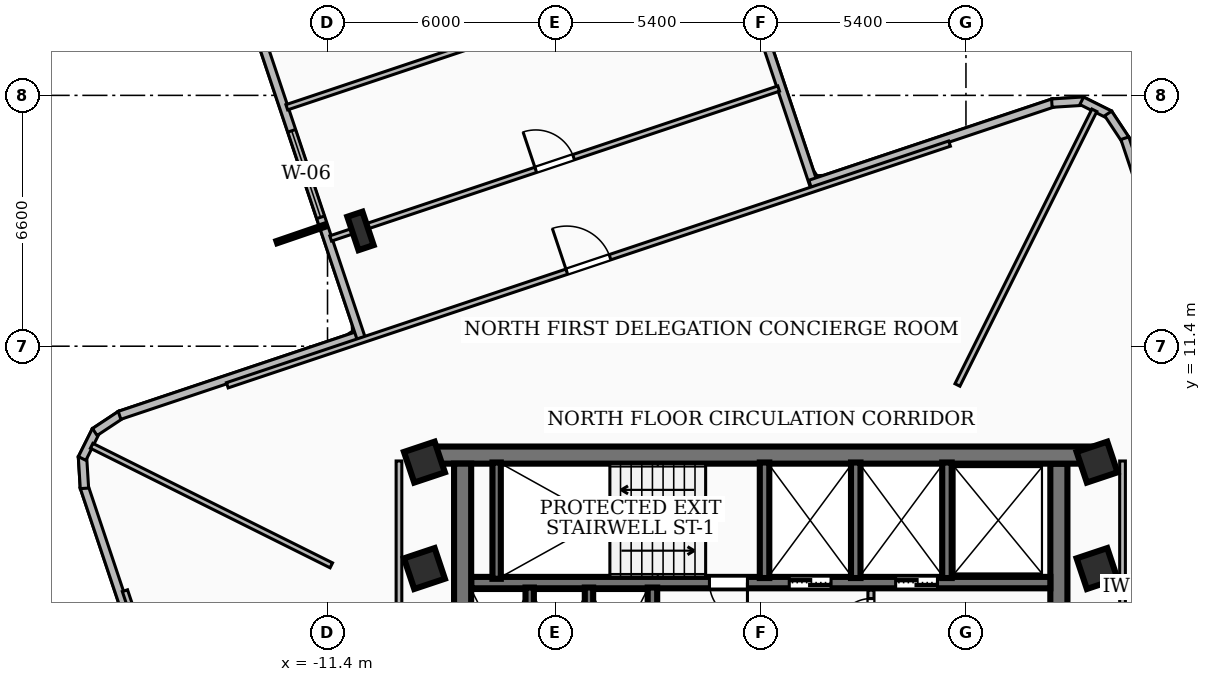
"""IFC4 building model, lengths in metres.
Left out: names, types, materials, properties, quantities, classifications, styles, units other than length and angle.
Written with IfcOpenShell. Run it as: python <this file> out.ifc"""

import sys

from ifc_helpers import new_model, si_unit, direction, frame, frame_2d, origin, origin_2d, place, context, subcontext, project, spatial, rectangle, i_section, extrude, element, fill, save


model = new_model("IFC4")
c1 = context("Model", 3, precision=1e-05, world=origin(), true_north=direction((0.0, 1.0)))
c2 = subcontext(c1, "Body", "Model", "MODEL_VIEW")
j1 = project(units=[si_unit("LENGTHUNIT", "METRE"), si_unit("PLANEANGLEUNIT", "RADIAN")], contexts=[c1])
p1 = place(None, origin())
s1 = spatial("IfcSite", under=j1, at=p1, CompositionType="ELEMENT")
p2 = place(p1, origin())
s2 = spatial("IfcBuilding", under=s1, at=p2, CompositionType="ELEMENT")
p3 = place(p2, frame((0.0, 0.0, 159.48)))
s3 = spatial("IfcBuildingStorey", under=s2, at=p3, CompositionType="ELEMENT", Elevation=159.48)
p4 = place(p3, frame((-8.78, 8.535, 0.0), z_axis=(0.0, 0.0, 1.0), x_axis=(1.0, 0.0, 0.0)))
e1 = element("IfcWall", 1, at=p4, inside=s3, PredefinedType="SHEAR", context=c2, shape_type="SweptSolid", body=[
    extrude(rectangle(XDim=17.56, YDim=0.45, at=frame_2d((8.78, 0.0))), origin(), (0.0, 0.0, 1.0), 3.34),
])
for number, where, z_axis, x_axis in (
    (2, (-7.845, 1.975, 0.0), (0.0, 0.0, 1.0), (0.0, 1.0, 0.0)),
    (3, (7.845, 8.31, 0.0), (0.0, 0.0, 1.0), (0.0, -1.0, 0.0)),
):
    element("IfcWall", number, at=place(p3, frame(where, z_axis=z_axis, x_axis=x_axis)), inside=s3, PredefinedType="SHEAR", context=c2, shape_type="SweptSolid", body=[
        extrude(rectangle(XDim=6.335, YDim=0.45, at=frame_2d((3.167, 0.0))), origin(), (0.0, 0.0, 1.0), 3.34),
    ])
p5 = place(p3, frame((7.62, 5.18, 0.0), z_axis=(0.0, 0.0, 1.0), x_axis=(-1.0, 0.0, 0.0)))
e4 = element("IfcWall", 4, at=p5, inside=s3, PredefinedType="SOLIDWALL", context=c2, shape_type="SweptSolid", body=[
    extrude(rectangle(XDim=15.24, YDim=0.3, at=frame_2d((7.62, 0.0))), origin(), (0.0, 0.0, 1.0), 3.34),
])
p6 = place(p5, frame((5.77, 0.0, 0.0)))
e5 = element("IfcOpeningElement", 5, at=p6, cuts=e4, PredefinedType="OPENING", context=c2, shape_type="SweptSolid", body=[
    extrude(rectangle(XDim=1.1, YDim=2.15, at=frame_2d((0.55, 1.075))), frame((0.0, 0.16, 0.0), z_axis=(0.0, -1.0, 0.0), x_axis=(1.0, 0.0, 0.0)), (0.0, 0.0, 1.0), 0.32),
])
p7 = place(p5, frame((2.97, 0.0, 0.0)))
e6 = element("IfcOpeningElement", 6, at=p7, cuts=e4, PredefinedType="OPENING", context=c2, shape_type="SweptSolid", body=[
    extrude(rectangle(XDim=1.1, YDim=2.15, at=frame_2d((0.55, 1.075))), frame((0.0, 0.16, 0.0), z_axis=(0.0, -1.0, 0.0), x_axis=(1.0, 0.0, 0.0)), (0.0, 0.0, 1.0), 0.32),
])
p8 = place(p5, frame((7.97, 0.0, 0.0)))
e7 = element("IfcOpeningElement", 7, at=p8, cuts=e4, PredefinedType="OPENING", context=c2, shape_type="SweptSolid", body=[
    extrude(rectangle(XDim=1.0, YDim=2.1, at=frame_2d((0.5, 1.05))), frame((0.0, 0.16, 0.0), z_axis=(0.0, -1.0, 0.0), x_axis=(1.0, 0.0, 0.0)), (0.0, 0.0, 1.0), 0.32),
])
p9 = place(p3, frame((-6.95, 5.28, 0.0), z_axis=(0.0, 0.0, 1.0), x_axis=(0.0, 1.0, 0.0)))
e8 = element("IfcWall", 8, at=p9, inside=s3, PredefinedType="SOLIDWALL", context=c2, shape_type="SweptSolid", body=[
    extrude(rectangle(XDim=3.06, YDim=0.22, at=frame_2d((1.53, 0.0))), origin(), (0.0, 0.0, 1.0), 3.34),
])
for number, where, z_axis, x_axis in (
    (9, (0.1, 5.3, 0.0), (0.0, 0.0, 1.0), (0.0, 1.0, 0.0)),
    (10, (2.5, 5.3, 0.0), (0.0, 0.0, 1.0), (0.0, 1.0, 0.0)),
    (11, (4.9, 5.3, 0.0), (0.0, 0.0, 1.0), (0.0, 1.0, 0.0)),
):
    element("IfcWall", number, at=place(p3, frame(where, z_axis=z_axis, x_axis=x_axis)), inside=s3, PredefinedType="SOLIDWALL", context=c2, shape_type="SweptSolid", body=[
        extrude(rectangle(XDim=3.04, YDim=0.25, at=frame_2d((1.52, 0.0))), origin(), (0.0, 0.0, 1.0), 3.34),
    ])
p10 = place(p3, frame((-2.85, 1.98, 0.0), z_axis=(0.0, 0.0, 1.0), x_axis=(0.0, 1.0, 0.0)))
e12 = element("IfcWall", 12, at=p10, inside=s3, PredefinedType="SOLIDWALL", context=c2, shape_type="SweptSolid", body=[
    extrude(rectangle(XDim=3.07, YDim=0.25, at=frame_2d((1.535, 0.0))), origin(), (0.0, 0.0, 1.0), 3.34),
])
for number, where, z_axis, x_axis in (
    (13, (-6.08, 1.98, 0.0), (0.0, 0.0, 1.0), (0.0, 1.0, 0.0)),
    (14, (-4.52, 1.98, 0.0), (0.0, 0.0, 1.0), (0.0, 1.0, 0.0)),
):
    element("IfcWall", number, at=place(p3, frame(where, z_axis=z_axis, x_axis=x_axis)), inside=s3, PredefinedType="SOLIDWALL", context=c2, shape_type="SweptSolid", body=[
        extrude(rectangle(XDim=3.07, YDim=0.22, at=frame_2d((1.535, 0.0))), origin(), (0.0, 0.0, 1.0), 3.34),
    ])
for number, where, z_axis, x_axis in (
    (15, (-8.85, 5.55, 0.0), (0.0, 0.0, 1.0), (0.948, 0.317, 0.0)),
    (16, (8.85, 5.55, 0.0), (0.0, 0.0, 1.0), (0.948, 0.317, 0.0)),
    (17, (-8.85, 8.35, 0.0), (0.0, 0.0, 1.0), (0.948, 0.317, 0.0)),
    (18, (8.85, 8.35, 0.0), (0.0, 0.0, 1.0), (0.948, 0.317, 0.0)),
):
    element("IfcColumn", number, at=place(p3, frame(where, z_axis=z_axis, x_axis=x_axis)), inside=s3, PredefinedType="COLUMN", context=c2, shape_type="SweptSolid", body=[
        extrude(rectangle(XDim=0.85, YDim=0.85, at=origin_2d()), origin(), (0.0, 0.0, 1.0), 3.6),
    ])
p11 = place(p3, frame((-10.533, 14.433, 0.0), z_axis=(0.0, 0.0, 1.0), x_axis=(0.948323655206, 0.317304656405, 0.0)))
e19 = element("IfcColumn", 19, at=p11, inside=s3, PredefinedType="COLUMN", context=c2, shape_type="SweptSolid", body=[
    extrude(i_section(OverallWidth=0.418, OverallDepth=0.927, WebThickness=0.019, FlangeThickness=0.032, at=origin_2d()), origin(), (0.0, 0.0, 1.0), 3.6),
])
p12 = place(p3, frame((-15.662, 1.3, 0.0), z_axis=(0.0, 0.0, 1.0), x_axis=(-0.317224676093, 0.948350412494, 0.0)))
e20 = element("IfcWall", 20, at=p12, inside=s3, PredefinedType="SOLIDWALL", context=c2, shape_type="SweptSolid", body=[
    extrude(rectangle(XDim=6.758, YDim=0.22, at=frame_2d((3.379, 0.0))), origin(), (0.0, 0.0, 1.0), 3.34),
])
p13 = place(p3, frame((-17.796, 7.66, 0.0), z_axis=(0.0, 0.0, 1.0), x_axis=(-0.062305442082, 0.998057128569, 0.0)))
e21 = element("IfcWall", 21, at=p13, inside=s3, PredefinedType="SOLIDWALL", context=c2, shape_type="SweptSolid", body=[
    extrude(rectangle(XDim=0.835, YDim=0.22, at=frame_2d((0.417, 0.0))), origin(), (0.0, 0.0, 1.0), 3.34),
])
p14 = place(p3, frame((-17.857, 8.446, 0.0), z_axis=(0.0, 0.0, 1.0), x_axis=(0.446258139106, 0.894904281631, 0.0)))
e22 = element("IfcWall", 22, at=p14, inside=s3, PredefinedType="SOLIDWALL", context=c2, shape_type="SweptSolid", body=[
    extrude(rectangle(XDim=0.818, YDim=0.22, at=frame_2d((0.409, 0.0))), origin(), (0.0, 0.0, 1.0), 3.34),
])
p15 = place(p3, frame((-17.524, 9.142, 0.0), z_axis=(0.0, 0.0, 1.0), x_axis=(0.833756011094, 0.552133058206, 0.0)))
e23 = element("IfcWall", 23, at=p15, inside=s3, PredefinedType="SOLIDWALL", context=c2, shape_type="SweptSolid", body=[
    extrude(rectangle(XDim=0.835, YDim=0.22, at=frame_2d((0.417, 0.0))), origin(), (0.0, 0.0, 1.0), 3.34),
])
p16 = place(p3, frame((-16.873, 9.581, 0.0), z_axis=(0.0, 0.0, 1.0), x_axis=(0.94829606055, 0.317387116224, 0.0)))
e24 = element("IfcWall", 24, at=p16, inside=s3, PredefinedType="SOLIDWALL", context=c2, shape_type="SweptSolid", body=[
    extrude(rectangle(XDim=6.758, YDim=0.22, at=frame_2d((3.379, 0.0))), origin(), (0.0, 0.0, 1.0), 3.34),
])
p17 = place(p3, frame((-10.519, 11.615, 0.0), z_axis=(0.0, 0.0, 1.0), x_axis=(-0.317229741122, 0.948348718219, 0.0)))
e25 = element("IfcWall", 25, at=p17, inside=s3, PredefinedType="SOLIDWALL", context=c2, shape_type="SweptSolid", body=[
    extrude(rectangle(XDim=8.259, YDim=0.22, at=frame_2d((4.129, 0.0))), origin(), (0.0, 0.0, 1.0), 3.34),
])
p18 = place(p17, frame((3.35, 0.0, 0.85)))
e26 = element("IfcOpeningElement", 26, at=p18, cuts=e25, PredefinedType="OPENING", context=c2, shape_type="SweptSolid", body=[
    extrude(rectangle(XDim=2.4, YDim=1.85, at=frame_2d((1.2, 0.925))), frame((0.0, 0.12, 0.0), z_axis=(0.0, -1.0, 0.0), x_axis=(1.0, 0.0, 0.0)), (0.0, 0.0, 1.0), 0.24),
])
p19 = place(p3, frame((-1.21, 23.438, 0.0), z_axis=(0.0, 0.0, 1.0), x_axis=(0.317371670522, -0.948301229963, 0.0)))
e27 = element("IfcWall", 27, at=p19, inside=s3, PredefinedType="SOLIDWALL", context=c2, shape_type="SweptSolid", body=[
    extrude(rectangle(XDim=8.258, YDim=0.22, at=frame_2d((4.129, 0.0))), origin(), (0.0, 0.0, 1.0), 3.34),
])
p20 = place(p19, frame((2.35, 0.0, 0.85)))
e28 = element("IfcOpeningElement", 28, at=p20, cuts=e27, PredefinedType="OPENING", context=c2, shape_type="SweptSolid", body=[
    extrude(rectangle(XDim=1.5, YDim=1.5, at=frame_2d((0.75, 0.75))), frame((0.0, 0.12, 0.0), z_axis=(0.0, -1.0, 0.0), x_axis=(1.0, 0.0, 0.0)), (0.0, 0.0, 1.0), 0.24),
])
p21 = place(p3, frame((1.3, 15.662, 0.0), z_axis=(0.0, 0.0, 1.0), x_axis=(0.948350412494, 0.317224676093, 0.0)))
e29 = element("IfcWall", 29, at=p21, inside=s3, PredefinedType="SOLIDWALL", context=c2, shape_type="SweptSolid", body=[
    extrude(rectangle(XDim=6.758, YDim=0.22, at=frame_2d((3.379, 0.0))), origin(), (0.0, 0.0, 1.0), 3.34),
])
p22 = place(p3, frame((7.66, 17.796, 0.0), z_axis=(0.0, 0.0, 1.0), x_axis=(0.998057128569, 0.062305442082, 0.0)))
e30 = element("IfcWall", 30, at=p22, inside=s3, PredefinedType="SOLIDWALL", context=c2, shape_type="SweptSolid", body=[
    extrude(rectangle(XDim=0.835, YDim=0.22, at=frame_2d((0.417, 0.0))), origin(), (0.0, 0.0, 1.0), 3.34),
])
p23 = place(p3, frame((8.446, 17.857, 0.0), z_axis=(0.0, 0.0, 1.0), x_axis=(0.894904281631, -0.446258139106, 0.0)))
e31 = element("IfcWall", 31, at=p23, inside=s3, PredefinedType="SOLIDWALL", context=c2, shape_type="SweptSolid", body=[
    extrude(rectangle(XDim=0.818, YDim=0.22, at=frame_2d((0.409, 0.0))), origin(), (0.0, 0.0, 1.0), 3.34),
])
p24 = place(p3, frame((9.142, 17.524, 0.0), z_axis=(0.0, 0.0, 1.0), x_axis=(0.552133058206, -0.833756011094, 0.0)))
e32 = element("IfcWall", 32, at=p24, inside=s3, PredefinedType="SOLIDWALL", context=c2, shape_type="SweptSolid", body=[
    extrude(rectangle(XDim=0.835, YDim=0.22, at=frame_2d((0.417, 0.0))), origin(), (0.0, 0.0, 1.0), 3.34),
])
p25 = place(p3, frame((9.581, 16.873, 0.0), z_axis=(0.0, 0.0, 1.0), x_axis=(0.317387116224, -0.94829606055, 0.0)))
e33 = element("IfcWall", 33, at=p25, inside=s3, PredefinedType="SOLIDWALL", context=c2, shape_type="SweptSolid", body=[
    extrude(rectangle(XDim=6.758, YDim=0.22, at=frame_2d((3.379, 0.0))), origin(), (0.0, 0.0, 1.0), 3.34),
])
p26 = place(p3, frame((2.9, 2.04, 0.0), z_axis=(0.0, 0.0, 1.0), x_axis=(0.0, 1.0, 0.0)))
e34 = element("IfcWall", 34, at=p26, inside=s3, PredefinedType="PARTITIONING", context=c2, shape_type="SweptSolid", body=[
    extrude(rectangle(XDim=2.94, YDim=0.16, at=frame_2d((1.47, 0.0))), origin(), (0.0, 0.0, 1.0), 2.57),
])
p27 = place(p26, frame((1.82, 0.0, 0.0)))
e35 = element("IfcOpeningElement", 35, at=p27, cuts=e34, PredefinedType="OPENING", context=c2, shape_type="SweptSolid", body=[
    extrude(rectangle(XDim=0.9, YDim=2.06, at=frame_2d((0.45, 1.03))), frame((0.0, 0.09, 0.0), z_axis=(0.0, -1.0, 0.0), x_axis=(1.0, 0.0, 0.0)), (0.0, 0.0, 1.0), 0.18),
])
p28 = place(p3, frame((-9.52, 1.75, 0.0), z_axis=(0.0, 0.0, 1.0), x_axis=(0.0, 1.0, 0.0)))
e36 = element("IfcWall", 36, at=p28, inside=s3, PredefinedType="PARTITIONING", context=c2, shape_type="SweptSolid", body=[
    extrude(rectangle(XDim=6.63, YDim=0.15, at=frame_2d((3.315, 0.0))), origin(), (0.0, 0.0, 1.0), 3.34),
])
p29 = place(p3, frame((9.52, 1.75, 0.0), z_axis=(0.0, 0.0, 1.0), x_axis=(0.0, 1.0, 0.0)))
e37 = element("IfcWall", 37, at=p29, inside=s3, PredefinedType="PARTITIONING", context=c2, shape_type="SweptSolid", body=[
    extrude(rectangle(XDim=6.63, YDim=0.15, at=frame_2d((3.315, 0.0))), origin(), (0.0, 0.0, 1.0), 2.644),
])
p30 = place(p3, frame((5.176, 10.38, 0.0), z_axis=(0.0, 0.0, 1.0), x_axis=(0.446173290391, 0.894946587759, 0.0)))
e38 = element("IfcWall", 38, at=p30, inside=s3, PredefinedType="PARTITIONING", context=c2, shape_type="SweptSolid", body=[
    extrude(rectangle(XDim=8.075, YDim=0.145, at=frame_2d((4.038, 0.0))), origin(), (0.0, 0.0, 1.0), 3.34),
])
p31 = place(p3, frame((-11.3, 5.634, 0.0), z_axis=(0.0, 0.0, 1.0), x_axis=(-0.894904738475, 0.446257222972, 0.0)))
e39 = element("IfcWall", 39, at=p31, inside=s3, PredefinedType="PARTITIONING", context=c2, shape_type="SweptSolid", body=[
    extrude(rectangle(XDim=7.048, YDim=0.145, at=frame_2d((3.524, 0.0))), origin(), (0.0, 0.0, 1.0), 3.34),
])
p32 = place(p3, frame((-14.037, 10.372, 0.0), z_axis=(0.0, 0.0, 1.0), x_axis=(0.94832575435, 0.317298382655, 0.0)))
e40 = element("IfcWall", 40, at=p32, inside=s3, PredefinedType="PARTITIONING", context=c2, shape_type="SweptSolid", body=[
    extrude(rectangle(XDim=20.041, YDim=0.145, at=frame_2d((10.021, 0.0))), origin(), (0.0, 0.0, 1.0), 2.644),
])
p33 = place(p32, frame((9.42, 0.0, 0.0)))
e41 = element("IfcOpeningElement", 41, at=p33, cuts=e40, PredefinedType="OPENING", context=c2, shape_type="SweptSolid", body=[
    extrude(rectangle(XDim=1.2, YDim=2.1, at=frame_2d((0.6, 1.05))), frame((0.0, 0.083, 0.0), z_axis=(0.0, -1.0, 0.0), x_axis=(1.0, 0.0, 0.0)), (0.0, 0.0, 1.0), 0.165),
])
p34 = place(p3, frame((-11.317, 14.235, 0.0), z_axis=(0.0, 0.0, 1.0), x_axis=(0.948331136084, 0.317282297544, 0.0)))
e42 = element("IfcWall", 42, at=p34, inside=s3, PredefinedType="PARTITIONING", context=c2, shape_type="SweptSolid", body=[
    extrude(rectangle(XDim=12.43, YDim=0.145, at=frame_2d((6.215, 0.0))), origin(), (0.0, 0.0, 1.0), 2.644),
])
p35 = place(p34, frame((5.69, 0.0, 0.0)))
e43 = element("IfcOpeningElement", 43, at=p35, cuts=e42, PredefinedType="OPENING", context=c2, shape_type="SweptSolid", body=[
    extrude(rectangle(XDim=1.05, YDim=2.08, at=frame_2d((0.525, 1.04))), frame((0.0, 0.083, 0.0), z_axis=(0.0, -1.0, 0.0), x_axis=(1.0, 0.0, 0.0)), (0.0, 0.0, 1.0), 0.165),
])
p36 = place(p3, frame((-12.472, 17.687, 0.0), z_axis=(0.0, 0.0, 1.0), x_axis=(0.948325226172, 0.317299961245, 0.0)))
e44 = element("IfcWall", 44, at=p36, inside=s3, PredefinedType="PARTITIONING", context=c2, shape_type="SweptSolid", body=[
    extrude(rectangle(XDim=12.43, YDim=0.145, at=frame_2d((6.215, 0.0))), origin(), (0.0, 0.0, 1.0), 3.34),
])
p37 = place(p36, frame((5.69, 0.0, 0.0)))
e45 = element("IfcOpeningElement", 45, at=p37, cuts=e44, PredefinedType="OPENING", context=c2, shape_type="SweptSolid", body=[
    extrude(rectangle(XDim=1.05, YDim=2.08, at=frame_2d((0.525, 1.04))), frame((0.0, 0.083, 0.0), z_axis=(0.0, -1.0, 0.0), x_axis=(1.0, 0.0, 0.0)), (0.0, 0.0, 1.0), 0.165),
])
p38 = place(p3, frame((-10.372, -14.037, 0.0), z_axis=(0.0, 0.0, 1.0), x_axis=(-0.317298382655, 0.94832575435, 0.0)))
e46 = element("IfcWall", 46, at=p38, inside=s3, PredefinedType="PARTITIONING", context=c2, shape_type="SweptSolid", body=[
    extrude(rectangle(XDim=20.041, YDim=0.145, at=frame_2d((10.021, 0.0))), origin(), (0.0, 0.0, 1.0), 2.644),
])
p39 = place(p38, frame((9.42, 0.0, 0.0)))
e47 = element("IfcOpeningElement", 47, at=p39, cuts=e46, PredefinedType="OPENING", context=c2, shape_type="SweptSolid", body=[
    extrude(rectangle(XDim=1.2, YDim=2.1, at=frame_2d((0.6, 1.05))), frame((0.0, 0.083, 0.0), z_axis=(0.0, -1.0, 0.0), x_axis=(1.0, 0.0, 0.0)), (0.0, 0.0, 1.0), 0.165),
])
p40 = place(p18, origin())
e48 = element("IfcWindow", 48, at=p40, inside=s3, PartitioningType="SINGLE_PANEL", PredefinedType="WINDOW", context=c2, shape_type="SweptSolid", body=[
    extrude(rectangle(XDim=2.4, YDim=1.85, at=frame_2d((1.2, 0.925))), frame((0.0, 0.03, 0.0), z_axis=(0.0, -1.0, 0.0), x_axis=(1.0, 0.0, 0.0)), (0.0, 0.0, 1.0), 0.06),
])
fill(e26, e48)
p41 = place(p6, origin())
e49 = element("IfcDoor", 49, at=p41, inside=s3, OperationType="DOUBLE_DOOR_SLIDING", PredefinedType="DOOR", context=c2, shape_type="SweptSolid", body=[
    extrude(rectangle(XDim=1.1, YDim=2.15, at=frame_2d((0.55, 1.075))), frame((0.0, 0.025, 0.0), z_axis=(0.0, -1.0, 0.0), x_axis=(1.0, 0.0, 0.0)), (0.0, 0.0, 1.0), 0.05),
])
fill(e5, e49)
p42 = place(p7, origin())
e50 = element("IfcDoor", 50, at=p42, inside=s3, OperationType="DOUBLE_DOOR_SLIDING", PredefinedType="DOOR", context=c2, shape_type="SweptSolid", body=[
    extrude(rectangle(XDim=1.1, YDim=2.15, at=frame_2d((0.55, 1.075))), frame((0.0, 0.025, 0.0), z_axis=(0.0, -1.0, 0.0), x_axis=(1.0, 0.0, 0.0)), (0.0, 0.0, 1.0), 0.05),
])
fill(e6, e50)
p43 = place(p8, origin())
e51 = element("IfcDoor", 51, at=p43, inside=s3, OperationType="SINGLE_SWING_LEFT", PredefinedType="DOOR", context=c2, shape_type="SweptSolid", body=[
    extrude(rectangle(XDim=1.0, YDim=2.1, at=frame_2d((0.5, 1.05))), frame((0.0, 0.025, 0.0), z_axis=(0.0, -1.0, 0.0), x_axis=(1.0, 0.0, 0.0)), (0.0, 0.0, 1.0), 0.05),
])
fill(e7, e51)
p44 = place(p27, origin())
e52 = element("IfcDoor", 52, at=p44, inside=s3, OperationType="SINGLE_SWING_LEFT", PredefinedType="DOOR", context=c2, shape_type="SweptSolid", body=[
    extrude(rectangle(XDim=0.9, YDim=2.06, at=frame_2d((0.45, 1.03))), frame((0.0, 0.025, 0.0), z_axis=(0.0, -1.0, 0.0), x_axis=(1.0, 0.0, 0.0)), (0.0, 0.0, 1.0), 0.05),
])
fill(e35, e52)
p45 = place(p33, origin())
e53 = element("IfcDoor", 53, at=p45, inside=s3, OperationType="SINGLE_SWING_LEFT", PredefinedType="DOOR", context=c2, shape_type="SweptSolid", body=[
    extrude(rectangle(XDim=1.2, YDim=2.1, at=frame_2d((0.6, 1.05))), frame((0.0, 0.025, 0.0), z_axis=(0.0, -1.0, 0.0), x_axis=(1.0, 0.0, 0.0)), (0.0, 0.0, 1.0), 0.05),
])
fill(e41, e53)
p46 = place(p35, origin())
e54 = element("IfcDoor", 54, at=p46, inside=s3, OperationType="SINGLE_SWING_LEFT", PredefinedType="DOOR", context=c2, shape_type="SweptSolid", body=[
    extrude(rectangle(XDim=1.05, YDim=2.08, at=frame_2d((0.525, 1.04))), frame((0.0, 0.025, 0.0), z_axis=(0.0, -1.0, 0.0), x_axis=(1.0, 0.0, 0.0)), (0.0, 0.0, 1.0), 0.05),
])
fill(e43, e54)
save(model, sys.argv[1])
